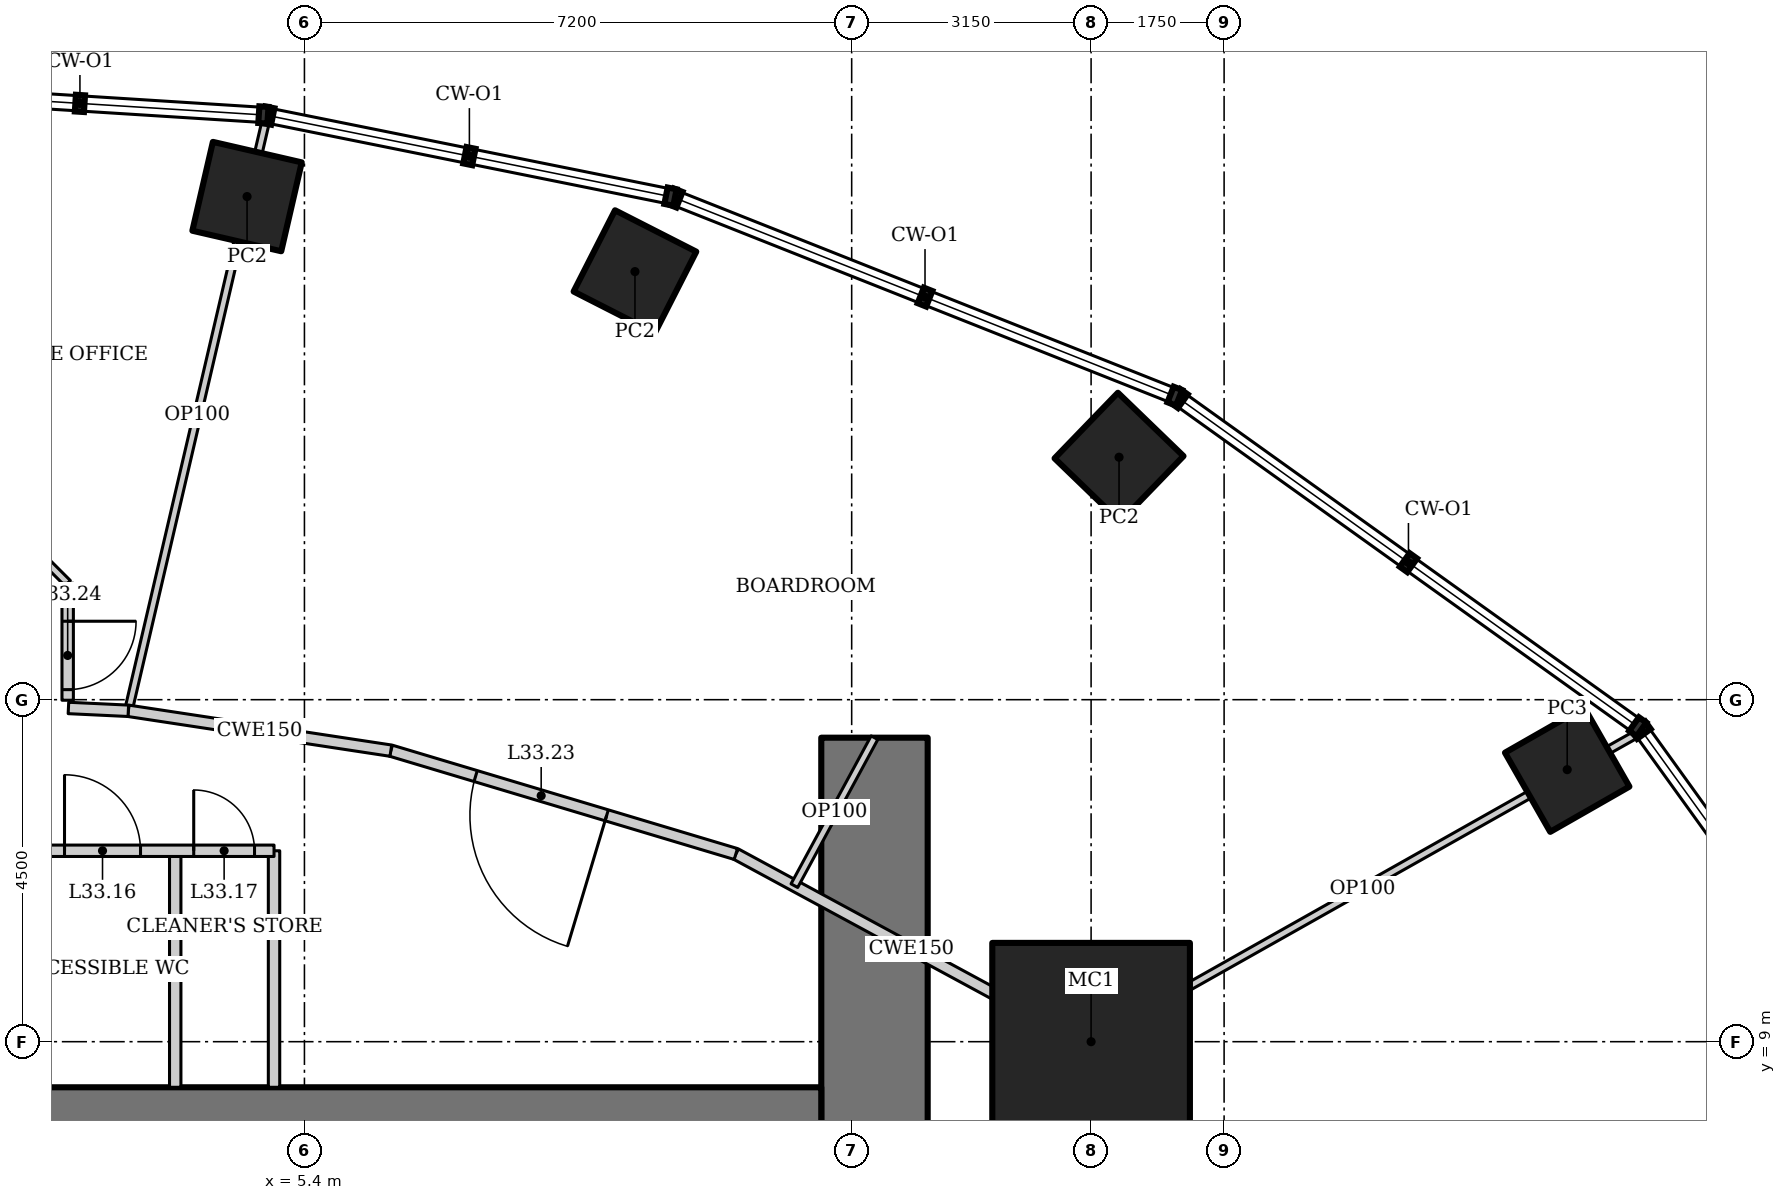
"""IFC4 building model, lengths in metres.
Left out: names, types, materials, properties, quantities, classifications, styles, units other than length and angle.
Written with IfcOpenShell. Run it as: python <this file> out.ifc"""

import sys

from ifc_helpers import new_model, si_unit, direction, frame, frame_2d, origin, origin_2d, place, context, subcontext, project, spatial, rectangle, hollow_rectangle, extrude, element, fill, save


model = new_model("IFC4")
c1 = context("Model", 3, precision=1e-05, world=origin(), true_north=direction((0.0, 1.0)))
c2 = subcontext(c1, "Body", "Model", "MODEL_VIEW")
j1 = project(units=[si_unit("LENGTHUNIT", "METRE"), si_unit("PLANEANGLEUNIT", "RADIAN")], contexts=[c1])
p1 = place(None, origin())
s1 = spatial("IfcSite", under=j1, at=p1, CompositionType="ELEMENT")
p2 = place(p1, origin())
s2 = spatial("IfcBuilding", under=s1, at=p2, CompositionType="ELEMENT")
p3 = place(p2, frame((0.0, 0.0, 142.6)))
s3 = spatial("IfcBuildingStorey", under=s2, at=p3, CompositionType="ELEMENT", Elevation=142.6)
p4 = place(p3, frame((15.75, 9.0, 0.0), z_axis=(0.0, 0.0, 1.0), x_axis=(1.0, 0.0, 0.0)))
e1 = element("IfcColumn", 1, at=p4, inside=s3, PredefinedType="COLUMN", context=c2, shape_type="SweptSolid", body=[
    extrude(hollow_rectangle(XDim=2.6, YDim=2.6, WallThickness=0.13, at=origin_2d()), origin(), (0.0, 0.0, 1.0), 4.2),
])
p5 = place(p3, frame((22.014, 12.579, 0.0), z_axis=(0.0, 0.0, 1.0), x_axis=(0.86824298017, 0.496139221777, 0.0)))
e2 = element("IfcColumn", 2, at=p5, inside=s3, PredefinedType="COLUMN", context=c2, shape_type="SweptSolid", body=[
    extrude(hollow_rectangle(XDim=1.2, YDim=1.2, WallThickness=0.12, at=origin_2d()), origin(), (0.0, 0.0, 1.0), 4.2),
])
for number, where, z_axis, x_axis in (
    (3, (16.118, 16.69, 0.0), (0.0, 0.0, 1.0), (0.695, 0.719, 0.0)),
    (4, (9.749, 19.133, 0.0), (0.0, 0.0, 1.0), (0.454, 0.891, 0.0)),
    (5, (4.645, 20.12, 0.0), (0.0, 0.0, 1.0), (0.225, 0.974, 0.0)),
):
    element("IfcColumn", number, at=place(p3, frame(where, z_axis=z_axis, x_axis=x_axis)), inside=s3, PredefinedType="COLUMN", context=c2, shape_type="SweptSolid", body=[
        extrude(hollow_rectangle(XDim=1.2, YDim=1.2, WallThickness=0.1, at=origin_2d()), origin(), (0.0, 0.0, 1.0), 4.2),
    ])
p6 = place(p3, frame((12.9, -13.0, 0.0), z_axis=(0.0, 0.0, 1.0), x_axis=(0.0, 1.0, 0.0)))
e6 = element("IfcWall", 6, at=p6, inside=s3, PredefinedType="SHEAR", context=c2, shape_type="SweptSolid", body=[
    extrude(rectangle(XDim=26.0, YDim=1.4, at=frame_2d((13.0, 0.0))), origin(), (0.0, 0.0, 1.0), 4.2),
])
p7 = place(p6, frame((12.1, 0.0, 0.0)))
e7 = element("IfcOpeningElement", 7, at=p7, cuts=e6, PredefinedType="OPENING", context=c2, shape_type="SweptSolid", body=[
    extrude(rectangle(XDim=1.8, YDim=2.1, at=frame_2d((0.9, 1.05))), frame((0.0, 0.71, 0.0), z_axis=(0.0, -1.0, 0.0), x_axis=(1.0, 0.0, 0.0)), (0.0, 0.0, 1.0), 1.42),
])
p8 = place(p3, frame((12.2, 7.6, 0.0), z_axis=(0.0, 0.0, 1.0), x_axis=(-1.0, 0.0, 0.0)))
e8 = element("IfcWall", 8, at=p8, inside=s3, PredefinedType="SHEAR", context=c2, shape_type="SweptSolid", body=[
    extrude(rectangle(XDim=24.4, YDim=1.6, at=frame_2d((12.2, 0.0))), origin(), (0.0, 0.0, 1.0), 4.2),
])
p9 = place(p3, frame((22.949, 13.059, 0.0), z_axis=(0.0, 0.0, 1.0), x_axis=(-0.871079462611, -0.491142107558, 0.0)))
e9 = element("IfcWall", 9, at=p9, inside=s3, PredefinedType="PARTITIONING", context=c2, shape_type="SweptSolid", body=[
    extrude(rectangle(XDim=8.327, YDim=0.1, at=frame_2d((4.164, 0.0))), origin(), (0.0, 0.0, 1.0), 3.45),
])
p10 = place(p3, frame((4.897, 21.135, 0.0), z_axis=(0.0, 0.0, 1.0), x_axis=(-0.227039313577, -0.973885593943, 0.0)))
e10 = element("IfcWall", 10, at=p10, inside=s3, PredefinedType="PARTITIONING", context=c2, shape_type="SweptSolid", body=[
    extrude(rectangle(XDim=7.99, YDim=0.1, at=frame_2d((3.995, 0.0))), origin(), (0.0, 0.0, 1.0), 3.293),
])
p11 = place(p3, frame((19.579, 4.882, 0.0), z_axis=(0.0, 0.0, 1.0), x_axis=(-0.688797257101, 0.72495402517, 0.0)))
e11 = element("IfcWall", 11, at=p11, inside=s3, PredefinedType="PARTITIONING", context=c2, shape_type="SweptSolid", body=[
    extrude(rectangle(XDim=5.638, YDim=0.15, at=frame_2d((2.819, 0.0))), origin(), (0.0, 0.0, 1.0), 4.05),
])
p12 = place(p11, frame((0.15, 0.0, 0.0)))
e12 = element("IfcOpeningElement", 12, at=p12, cuts=e11, PredefinedType="OPENING", context=c2, shape_type="SweptSolid", body=[
    extrude(rectangle(XDim=0.9, YDim=2.1, at=frame_2d((0.45, 1.05))), frame((0.0, 0.085, 0.0), z_axis=(0.0, -1.0, 0.0), x_axis=(1.0, 0.0, 0.0)), (0.0, 0.0, 1.0), 0.17),
])
p13 = place(p3, frame((15.696, 8.969, 0.0), z_axis=(0.0, 0.0, 1.0), x_axis=(-0.879436285334, 0.476016617397, 0.0)))
e13 = element("IfcWall", 13, at=p13, inside=s3, PredefinedType="PARTITIONING", context=c2, shape_type="SweptSolid", body=[
    extrude(rectangle(XDim=5.253, YDim=0.15, at=frame_2d((2.626, 0.0))), origin(), (0.0, 0.0, 1.0), 4.05),
])
p14 = place(p3, frame((11.076, 11.469, 0.0), z_axis=(0.0, 0.0, 1.0), x_axis=(-0.957933992798, 0.286988615527, 0.0)))
e14 = element("IfcWall", 14, at=p14, inside=s3, PredefinedType="PARTITIONING", context=c2, shape_type="SweptSolid", body=[
    extrude(rectangle(XDim=4.738, YDim=0.15, at=frame_2d((2.369, 0.0))), origin(), (0.0, 0.0, 1.0), 4.05),
])
p15 = place(p14, frame((1.774, 0.0, 0.0)))
e15 = element("IfcOpeningElement", 15, at=p15, cuts=e14, PredefinedType="OPENING", context=c2, shape_type="SweptSolid", body=[
    extrude(rectangle(XDim=1.8, YDim=2.1, at=frame_2d((0.9, 1.05))), frame((0.0, 0.085, 0.0), z_axis=(0.0, -1.0, 0.0), x_axis=(1.0, 0.0, 0.0)), (0.0, 0.0, 1.0), 0.17),
])
p16 = place(p3, frame((6.537, 12.829, 0.0), z_axis=(0.0, 0.0, 1.0), x_axis=(-0.988668719464, 0.150113833987, 0.0)))
e16 = element("IfcWall", 16, at=p16, inside=s3, PredefinedType="PARTITIONING", context=c2, shape_type="SweptSolid", body=[
    extrude(rectangle(XDim=3.493, YDim=0.15, at=frame_2d((1.747, 0.0))), origin(), (0.0, 0.0, 1.0), 4.05),
])
for number, where, z_axis, x_axis in (
    (17, (5.0, 8.4, 0.0), (0.0, 0.0, 1.0), (0.0, 1.0, 0.0)),
    (18, (3.7, 8.4, 0.0), (0.0, 0.0, 1.0), (0.0, 1.0, 0.0)),
):
    element("IfcWall", number, at=place(p3, frame(where, z_axis=z_axis, x_axis=x_axis)), inside=s3, PredefinedType="SOLIDWALL", context=c2, shape_type="SweptSolid", body=[
        extrude(rectangle(XDim=3.112, YDim=0.15, at=frame_2d((1.556, 0.0))), origin(), (0.0, 0.0, 1.0), 4.05),
    ])
p17 = place(p3, frame((12.9, 13.0, 0.0), z_axis=(0.0, 0.0, 1.0), x_axis=(-0.475998959765, -0.879445842734, 0.0)))
e19 = element("IfcWall", 19, at=p17, inside=s3, PredefinedType="PARTITIONING", context=c2, shape_type="SweptSolid", body=[
    extrude(rectangle(XDim=2.214, YDim=0.1, at=frame_2d((1.107, 0.0))), origin(), (0.0, 0.0, 1.0), 4.05),
])
p18 = place(p3, frame((3.083, 13.354, 0.0), z_axis=(0.0, 0.0, 1.0), x_axis=(-0.998878614804, 0.04734461836, 0.0)))
e20 = element("IfcWall", 20, at=p18, inside=s3, PredefinedType="PARTITIONING", context=c2, shape_type="SweptSolid", body=[
    extrude(rectangle(XDim=0.789, YDim=0.15, at=frame_2d((0.395, 0.0))), origin(), (0.0, 0.0, 1.0), 4.05),
])
p19 = place(p3, frame((1.844, 11.512, 0.0), z_axis=(0.0, 0.0, 1.0), x_axis=(1.0, 0.0, 0.0)))
e21 = element("IfcWall", 21, at=p19, inside=s3, PredefinedType="SOLIDWALL", context=c2, shape_type="SweptSolid", body=[
    extrude(rectangle(XDim=3.156, YDim=0.15, at=frame_2d((1.578, 0.0))), origin(), (0.0, 0.0, 1.0), 4.05),
])
p20 = place(p19, frame((0.4, 0.0, 0.0)))
e22 = element("IfcOpeningElement", 22, at=p20, cuts=e21, PredefinedType="OPENING", context=c2, shape_type="SweptSolid", body=[
    extrude(rectangle(XDim=1.0, YDim=2.1, at=frame_2d((0.5, 1.05))), frame((0.0, 0.085, 0.0), z_axis=(0.0, -1.0, 0.0), x_axis=(1.0, 0.0, 0.0)), (0.0, 0.0, 1.0), 0.17),
])
p21 = place(p19, frame((2.1, 0.0, 0.0)))
e23 = element("IfcOpeningElement", 23, at=p21, cuts=e21, PredefinedType="OPENING", context=c2, shape_type="SweptSolid", body=[
    extrude(rectangle(XDim=0.8, YDim=2.1, at=frame_2d((0.4, 1.05))), frame((0.0, 0.085, 0.0), z_axis=(0.0, -1.0, 0.0), x_axis=(1.0, 0.0, 0.0)), (0.0, 0.0, 1.0), 0.17),
])
p22 = place(p3, frame((1.532, 15.785, 0.0), z_axis=(0.0, 0.0, 1.0), x_axis=(0.707106781187, -0.707106781187, 0.0)))
e24 = element("IfcWall", 24, at=p22, inside=s3, PredefinedType="PARTITIONING", context=c2, shape_type="SweptSolid", body=[
    extrude(rectangle(XDim=1.064, YDim=0.1, at=frame_2d((0.532, 0.0))), origin(), (0.0, 0.0, 1.0), 4.05),
])
p23 = place(p3, frame((2.285, 15.032, 0.0), z_axis=(0.0, 0.0, 1.0), x_axis=(0.0, -1.0, 0.0)))
e25 = element("IfcWall", 25, at=p23, inside=s3, PredefinedType="PARTITIONING", context=c2, shape_type="SweptSolid", body=[
    extrude(rectangle(XDim=1.54, YDim=0.15, at=frame_2d((0.77, 0.0))), origin(), (0.0, 0.0, 1.0), 4.05),
])
p24 = place(p23, frame((0.5, 0.0, 0.0)))
e26 = element("IfcOpeningElement", 26, at=p24, cuts=e25, PredefinedType="OPENING", context=c2, shape_type="SweptSolid", body=[
    extrude(rectangle(XDim=0.9, YDim=2.1, at=frame_2d((0.45, 1.05))), frame((0.0, 0.085, 0.0), z_axis=(0.0, -1.0, 0.0), x_axis=(1.0, 0.0, 0.0)), (0.0, 0.0, 1.0), 0.17),
])
p25 = place(p20, origin())
e27 = element("IfcDoor", 27, at=p25, inside=s3, OperationType="SINGLE_SWING_LEFT", PredefinedType="DOOR", context=c2, shape_type="SweptSolid", body=[
    extrude(rectangle(XDim=1.0, YDim=2.1, at=frame_2d((0.5, 1.05))), frame((0.0, 0.025, 0.0), z_axis=(0.0, -1.0, 0.0), x_axis=(1.0, 0.0, 0.0)), (0.0, 0.0, 1.0), 0.05),
])
fill(e22, e27)
p26 = place(p21, origin())
e28 = element("IfcDoor", 28, at=p26, inside=s3, OperationType="SINGLE_SWING_LEFT", PredefinedType="DOOR", context=c2, shape_type="SweptSolid", body=[
    extrude(rectangle(XDim=0.8, YDim=2.1, at=frame_2d((0.4, 1.05))), frame((0.0, 0.025, 0.0), z_axis=(0.0, -1.0, 0.0), x_axis=(1.0, 0.0, 0.0)), (0.0, 0.0, 1.0), 0.05),
])
fill(e23, e28)
p27 = place(p15, origin())
e29 = element("IfcDoor", 29, at=p27, inside=s3, OperationType="DOUBLE_DOOR_DOUBLE_SWING", PredefinedType="DOOR", context=c2, shape_type="SweptSolid", body=[
    extrude(rectangle(XDim=1.8, YDim=2.1, at=frame_2d((0.9, 1.05))), frame((0.0, 0.025, 0.0), z_axis=(0.0, -1.0, 0.0), x_axis=(1.0, 0.0, 0.0)), (0.0, 0.0, 1.0), 0.05),
])
fill(e15, e29)
p28 = place(p24, origin())
e30 = element("IfcDoor", 30, at=p28, inside=s3, OperationType="SINGLE_SWING_LEFT", PredefinedType="DOOR", context=c2, shape_type="SweptSolid", body=[
    extrude(rectangle(XDim=0.9, YDim=2.1, at=frame_2d((0.45, 1.05))), frame((0.0, 0.025, 0.0), z_axis=(0.0, -1.0, 0.0), x_axis=(1.0, 0.0, 0.0)), (0.0, 0.0, 1.0), 0.05),
])
fill(e26, e30)
save(model, sys.argv[1])
